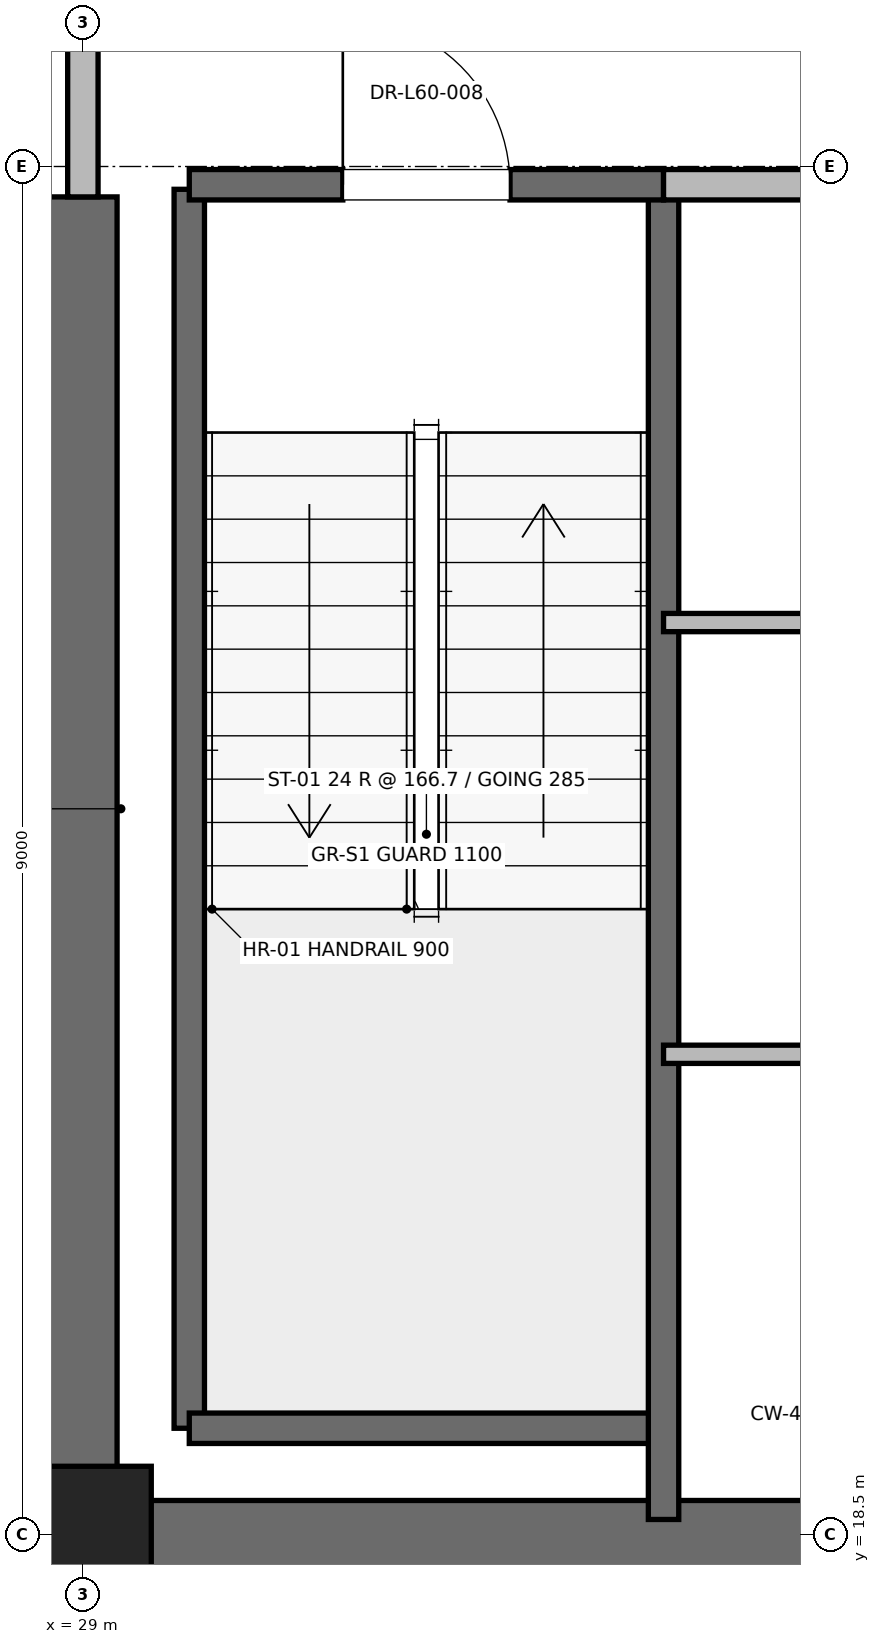
"""IFC4 building model, lengths in metres.
Left out: names, types, materials, properties, quantities, classifications, styles, units other than length and angle.
Written with IfcOpenShell. Run it as: python <this file> out.ifc"""

import sys

from ifc_helpers import new_model, si_unit, direction, frame, frame_2d, origin, origin_2d, place, context, subcontext, project, spatial, rectangle, extrude, element, fill, save


model = new_model("IFC4")
c1 = context("Model", 3, precision=1e-05, world=origin(), true_north=direction((0.0, 1.0)))
c2 = subcontext(c1, "Body", "Model", "MODEL_VIEW")
j1 = project(units=[si_unit("LENGTHUNIT", "METRE"), si_unit("PLANEANGLEUNIT", "RADIAN")], contexts=[c1])
p1 = place(None, origin())
s1 = spatial("IfcSite", under=j1, at=p1, CompositionType="ELEMENT")
p2 = place(p1, origin())
s2 = spatial("IfcBuilding", under=s1, at=p2, CompositionType="ELEMENT")
p3 = place(p2, frame((0.0, 0.0, 259.2)))
s3 = spatial("IfcBuildingStorey", under=s2, at=p3, CompositionType="ELEMENT", Elevation=259.2)
p4 = place(p3, frame((29.0, 18.5, 0.0), z_axis=(0.0, 0.0, 1.0), x_axis=(1.0, 0.0, 0.0)))
e1 = element("IfcColumn", 1, at=p4, inside=s3, PredefinedType="PILASTER", context=c2, shape_type="SweptSolid", body=[
    extrude(rectangle(XDim=0.9, YDim=0.9, at=origin_2d()), origin(), (0.0, 0.0, 1.0), 4.0),
])
p5 = place(p3, frame((29.0, 18.5, 0.0), z_axis=(0.0, 0.0, 1.0), x_axis=(1.0, 0.0, 0.0)))
e2 = element("IfcWall", 2, at=p5, inside=s3, PredefinedType="SHEAR", context=c2, shape_type="SweptSolid", body=[
    extrude(rectangle(XDim=9.2, YDim=0.45, at=frame_2d((4.6, 0.0))), origin(), (0.0, 0.0, 1.0), 3.785),
])
p6 = place(p3, frame((29.0, 18.5, 0.0), z_axis=(0.0, 0.0, 1.0), x_axis=(0.0, 1.0, 0.0)))
e3 = element("IfcWall", 3, at=p6, inside=s3, PredefinedType="SHEAR", context=c2, shape_type="SweptSolid", body=[
    extrude(rectangle(XDim=8.8, YDim=0.45, at=frame_2d((4.4, 0.0))), origin(), (0.0, 0.0, 1.0), 3.785),
])
p7 = place(p3, frame((29.7, 19.2, 0.0), z_axis=(0.0, 0.0, 1.0), x_axis=(0.0, 1.0, 0.0)))
e4 = element("IfcWall", 4, at=p7, inside=s3, PredefinedType="SOLIDWALL", context=c2, shape_type="SweptSolid", body=[
    extrude(rectangle(XDim=8.15, YDim=0.2, at=frame_2d((4.075, 0.0))), origin(), (0.0, 0.0, 1.0), 3.785),
])
p8 = place(p3, frame((29.7, 19.2, 0.0), z_axis=(0.0, 0.0, 1.0), x_axis=(1.0, 0.0, 0.0)))
e5 = element("IfcWall", 5, at=p8, inside=s3, PredefinedType="SOLIDWALL", context=c2, shape_type="SweptSolid", body=[
    extrude(rectangle(XDim=3.12, YDim=0.2, at=frame_2d((1.56, 0.0))), origin(), (0.0, 0.0, 1.0), 3.785),
])
p9 = place(p3, frame((32.82, 18.6, 0.0), z_axis=(0.0, 0.0, 1.0), x_axis=(0.0, 1.0, 0.0)))
e6 = element("IfcWall", 6, at=p9, inside=s3, PredefinedType="SOLIDWALL", context=c2, shape_type="SweptSolid", body=[
    extrude(rectangle(XDim=8.78, YDim=0.2, at=frame_2d((4.39, 0.0))), origin(), (0.0, 0.0, 1.0), 3.785),
])
p10 = place(p3, frame((29.7, 27.38, 0.0), z_axis=(0.0, 0.0, 1.0), x_axis=(1.0, 0.0, 0.0)))
e7 = element("IfcWall", 7, at=p10, inside=s3, PredefinedType="SOLIDWALL", context=c2, shape_type="SweptSolid", body=[
    extrude(rectangle(XDim=3.12, YDim=0.2, at=frame_2d((1.56, 0.0))), origin(), (0.0, 0.0, 1.0), 3.785),
])
p11 = place(p10, frame((1.01, 0.0, 0.0)))
e8 = element("IfcOpeningElement", 8, at=p11, cuts=e7, PredefinedType="OPENING", context=c2, shape_type="SweptSolid", body=[
    extrude(rectangle(XDim=1.1, YDim=2.15, at=frame_2d((0.55, 1.075))), frame((0.0, 0.1, 0.0), z_axis=(0.0, -1.0, 0.0), x_axis=(1.0, 0.0, 0.0)), (0.0, 0.0, 1.0), 0.2),
])
p12 = place(p3, frame((29.0, 27.3, 0.0), z_axis=(0.0, 0.0, 1.0), x_axis=(0.0, 1.0, 0.0)))
e9 = element("IfcWall", 9, at=p12, inside=s3, PredefinedType="PARTITIONING", context=c2, shape_type="SweptSolid", body=[
    extrude(rectangle(XDim=3.4, YDim=0.2, at=frame_2d((1.7, 0.0))), origin(), (0.0, 0.0, 1.0), 2.865),
])
p13 = place(p12, frame((1.125, 0.0, 0.0)))
e10 = element("IfcOpeningElement", 10, at=p13, cuts=e9, PredefinedType="OPENING", context=c2, shape_type="SweptSolid", body=[
    extrude(rectangle(XDim=1.15, YDim=2.2, at=frame_2d((0.575, 1.1))), frame((0.0, 0.1, 0.0), z_axis=(0.0, -1.0, 0.0), x_axis=(1.0, 0.0, 0.0)), (0.0, 0.0, 1.0), 0.2),
])
p14 = place(p3, frame((32.82, 27.38, 0.0), z_axis=(0.0, 0.0, 1.0), x_axis=(1.0, 0.0, 0.0)))
e11 = element("IfcWall", 11, at=p14, inside=s3, PredefinedType="PARTITIONING", context=c2, shape_type="SweptSolid", body=[
    extrude(rectangle(XDim=5.62, YDim=0.2, at=frame_2d((2.81, 0.0))), origin(), (0.0, 0.0, 1.0), 3.785),
])
for number, where, z_axis, x_axis in (
    (12, (32.82, 21.66, 0.0), (0.0, 0.0, 1.0), (1.0, 0.0, 0.0)),
    (13, (32.82, 24.5, 0.0), (0.0, 0.0, 1.0), (1.0, 0.0, 0.0)),
):
    element("IfcWall", number, at=place(p3, frame(where, z_axis=z_axis, x_axis=x_axis)), inside=s3, PredefinedType="PARTITIONING", context=c2, shape_type="SweptSolid", body=[
        extrude(rectangle(XDim=5.23, YDim=0.12, at=frame_2d((2.615, 0.0))), origin(), (0.0, 0.0, 1.0), 2.85),
    ])
p15 = place(p11, origin())
e14 = element("IfcDoor", 14, at=p15, inside=s3, OperationType="SINGLE_SWING_LEFT", PredefinedType="DOOR", context=c2, shape_type="SweptSolid", body=[
    extrude(rectangle(XDim=1.1, YDim=2.15, at=frame_2d((0.55, 1.075))), frame((0.0, 0.025, 0.0), z_axis=(0.0, -1.0, 0.0), x_axis=(1.0, 0.0, 0.0)), (0.0, 0.0, 1.0), 0.05),
])
fill(e8, e14)
save(model, sys.argv[1])
